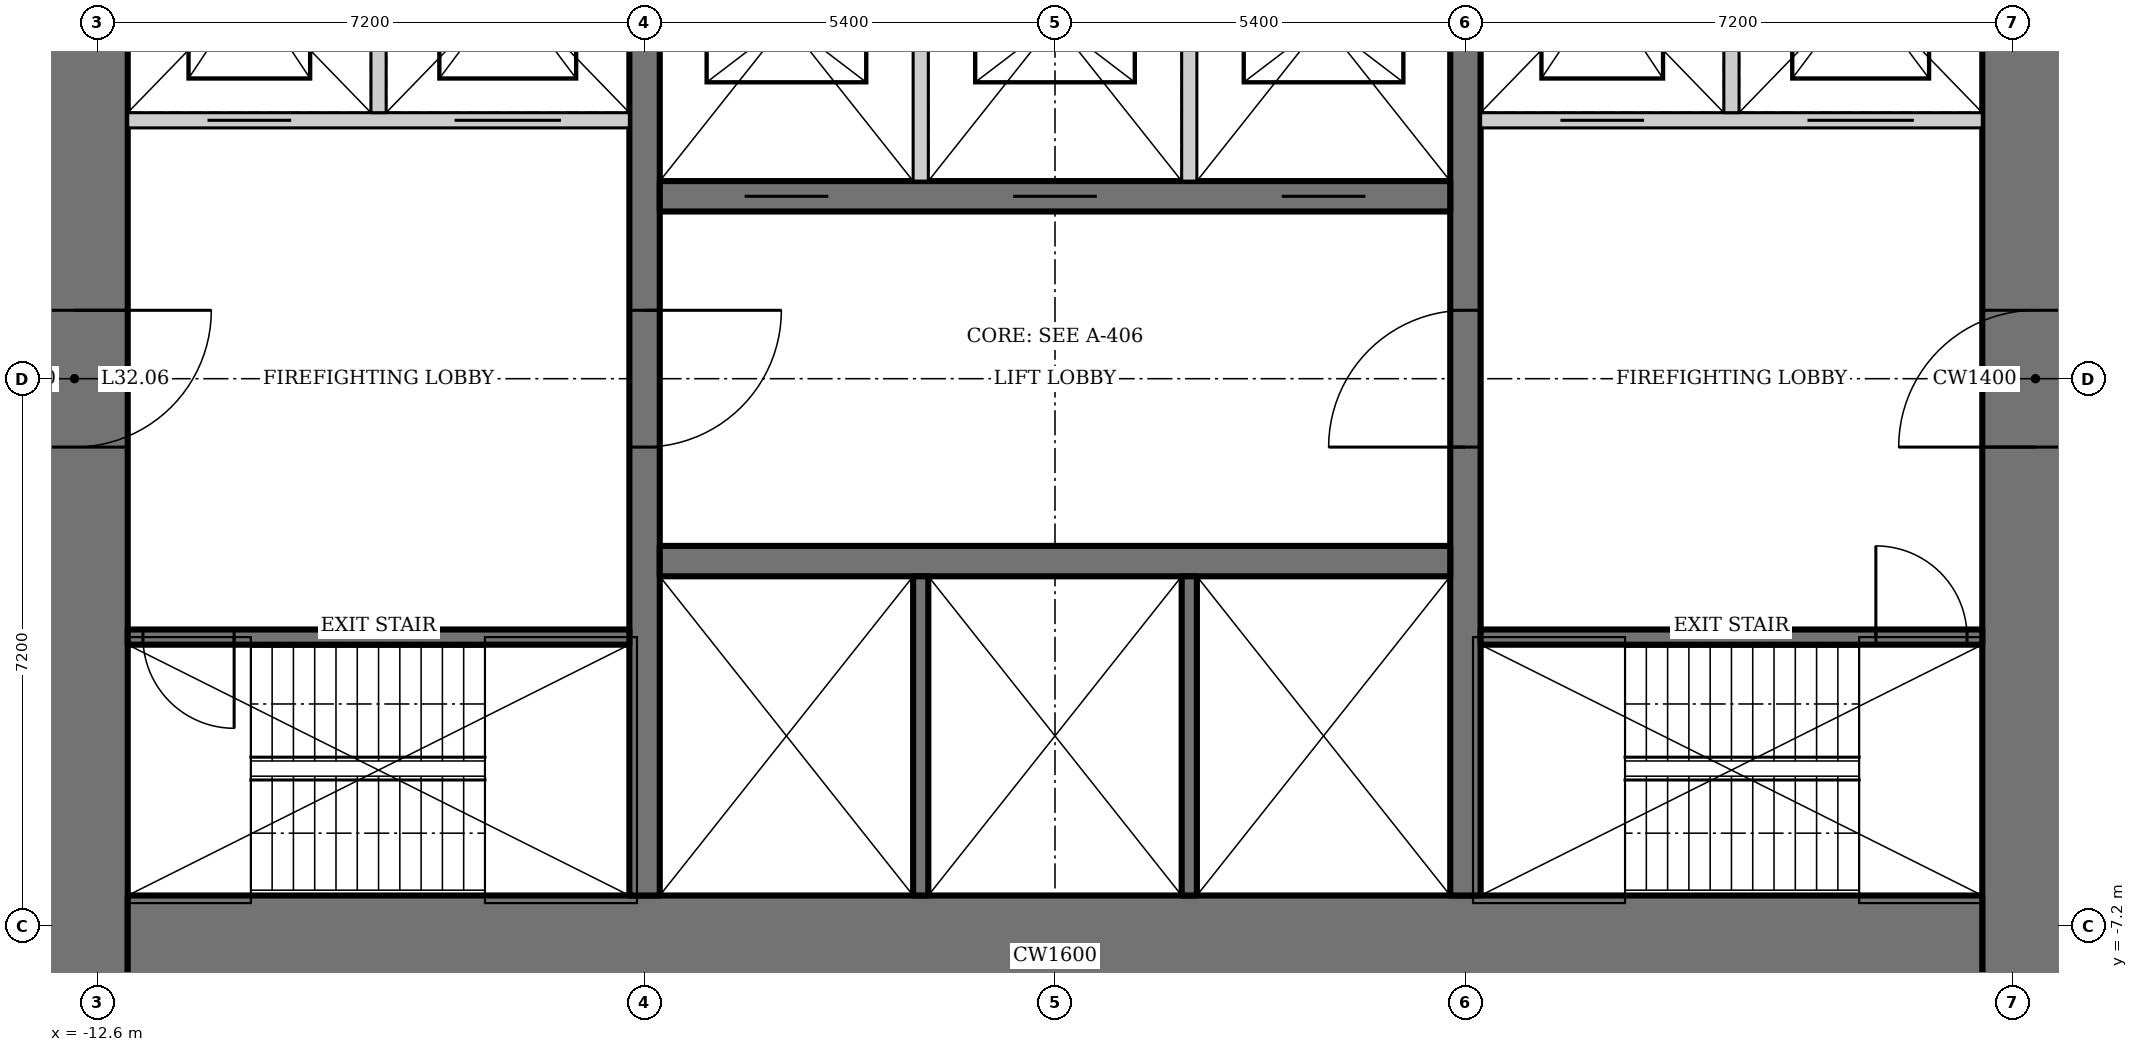
"""IFC4 building model, lengths in metres.
Left out: names, types, materials, properties, quantities, classifications, styles, units other than length and angle.
Written with IfcOpenShell. Run it as: python <this file> out.ifc"""

import sys

from ifc_helpers import new_model, si_unit, direction, frame, frame_2d, origin, place, context, subcontext, project, spatial, rectangle, extrude, element, fill, save


model = new_model("IFC4")
c1 = context("Model", 3, precision=1e-05, world=origin(), true_north=direction((0.0, 1.0)))
c2 = subcontext(c1, "Body", "Model", "MODEL_VIEW")
j1 = project(units=[si_unit("LENGTHUNIT", "METRE"), si_unit("PLANEANGLEUNIT", "RADIAN")], contexts=[c1])
p1 = place(None, origin())
s1 = spatial("IfcSite", under=j1, at=p1, CompositionType="ELEMENT")
p2 = place(p1, origin())
s2 = spatial("IfcBuilding", under=s1, at=p2, CompositionType="ELEMENT")
p3 = place(p2, frame((0.0, 0.0, 138.4)))
s3 = spatial("IfcBuildingStorey", under=s2, at=p3, CompositionType="ELEMENT", Elevation=138.4)
p4 = place(p3, frame((12.9, -13.0, 0.0), z_axis=(0.0, 0.0, 1.0), x_axis=(0.0, 1.0, 0.0)))
e1 = element("IfcWall", 1, at=p4, inside=s3, PredefinedType="SHEAR", context=c2, shape_type="SweptSolid", body=[
    extrude(rectangle(XDim=26.0, YDim=1.4, at=frame_2d((13.0, 0.0))), origin(), (0.0, 0.0, 1.0), 4.2),
])
p5 = place(p4, frame((12.1, 0.0, 0.0)))
e2 = element("IfcOpeningElement", 2, at=p5, cuts=e1, PredefinedType="OPENING", context=c2, shape_type="SweptSolid", body=[
    extrude(rectangle(XDim=1.8, YDim=2.1, at=frame_2d((0.9, 1.05))), frame((0.0, 0.71, 0.0), z_axis=(0.0, -1.0, 0.0), x_axis=(1.0, 0.0, 0.0)), (0.0, 0.0, 1.0), 1.42),
])
p6 = place(p3, frame((-12.9, 13.0, 0.0), z_axis=(0.0, 0.0, 1.0), x_axis=(0.0, -1.0, 0.0)))
e3 = element("IfcWall", 3, at=p6, inside=s3, PredefinedType="SHEAR", context=c2, shape_type="SweptSolid", body=[
    extrude(rectangle(XDim=26.0, YDim=1.4, at=frame_2d((13.0, 0.0))), origin(), (0.0, 0.0, 1.0), 4.2),
])
p7 = place(p6, frame((12.1, 0.0, 0.0)))
e4 = element("IfcOpeningElement", 4, at=p7, cuts=e3, PredefinedType="OPENING", context=c2, shape_type="SweptSolid", body=[
    extrude(rectangle(XDim=1.8, YDim=2.1, at=frame_2d((0.9, 1.05))), frame((0.0, 0.71, 0.0), z_axis=(0.0, -1.0, 0.0), x_axis=(1.0, 0.0, 0.0)), (0.0, 0.0, 1.0), 1.42),
])
p8 = place(p3, frame((-12.2, -7.6, 0.0), z_axis=(0.0, 0.0, 1.0), x_axis=(1.0, 0.0, 0.0)))
e5 = element("IfcWall", 5, at=p8, inside=s3, PredefinedType="SHEAR", context=c2, shape_type="SweptSolid", body=[
    extrude(rectangle(XDim=24.4, YDim=1.6, at=frame_2d((12.2, 0.0))), origin(), (0.0, 0.0, 1.0), 4.2),
])
p9 = place(p3, frame((5.4, -6.8, 0.0), z_axis=(0.0, 0.0, 1.0), x_axis=(0.0, 1.0, 0.0)))
e6 = element("IfcWall", 6, at=p9, inside=s3, PredefinedType="SHEAR", context=c2, shape_type="SweptSolid", body=[
    extrude(rectangle(XDim=13.6, YDim=0.4, at=frame_2d((6.8, 0.0))), origin(), (0.0, 0.0, 1.0), 4.2),
])
p10 = place(p9, frame((5.9, 0.0, 0.0)))
e7 = element("IfcOpeningElement", 7, at=p10, cuts=e6, PredefinedType="OPENING", context=c2, shape_type="SweptSolid", body=[
    extrude(rectangle(XDim=1.8, YDim=2.1, at=frame_2d((0.9, 1.05))), frame((0.0, 0.21, 0.0), z_axis=(0.0, -1.0, 0.0), x_axis=(1.0, 0.0, 0.0)), (0.0, 0.0, 1.0), 0.42),
])
p11 = place(p3, frame((-5.4, 6.8, 0.0), z_axis=(0.0, 0.0, 1.0), x_axis=(0.0, -1.0, 0.0)))
e8 = element("IfcWall", 8, at=p11, inside=s3, PredefinedType="SHEAR", context=c2, shape_type="SweptSolid", body=[
    extrude(rectangle(XDim=13.6, YDim=0.4, at=frame_2d((6.8, 0.0))), origin(), (0.0, 0.0, 1.0), 4.2),
])
p12 = place(p11, frame((5.9, 0.0, 0.0)))
e9 = element("IfcOpeningElement", 9, at=p12, cuts=e8, PredefinedType="OPENING", context=c2, shape_type="SweptSolid", body=[
    extrude(rectangle(XDim=1.8, YDim=2.1, at=frame_2d((0.9, 1.05))), frame((0.0, 0.21, 0.0), z_axis=(0.0, -1.0, 0.0), x_axis=(1.0, 0.0, 0.0)), (0.0, 0.0, 1.0), 0.42),
])
p13 = place(p3, frame((-5.2, -2.4, 0.0), z_axis=(0.0, 0.0, 1.0), x_axis=(1.0, 0.0, 0.0)))
e10 = element("IfcWall", 10, at=p13, inside=s3, PredefinedType="SHEAR", context=c2, shape_type="SweptSolid", body=[
    extrude(rectangle(XDim=10.4, YDim=0.4, at=frame_2d((5.2, 0.0))), origin(), (0.0, 0.0, 1.0), 4.2),
])
for number, where, z_axis, x_axis in (
    (11, (-1.767, -2.6, 0.0), (0.0, 0.0, 1.0), (0.0, -1.0, 0.0)),
    (12, (1.767, -2.6, 0.0), (0.0, 0.0, 1.0), (0.0, -1.0, 0.0)),
):
    element("IfcWall", number, at=place(p3, frame(where, z_axis=z_axis, x_axis=x_axis)), inside=s3, PredefinedType="SOLIDWALL", context=c2, shape_type="SweptSolid", body=[
        extrude(rectangle(XDim=4.2, YDim=0.2, at=frame_2d((2.1, 0.0))), origin(), (0.0, 0.0, 1.0), 4.2),
    ])
p14 = place(p3, frame((5.2, 2.4, 0.0), z_axis=(0.0, 0.0, 1.0), x_axis=(-1.0, 0.0, 0.0)))
e13 = element("IfcWall", 13, at=p14, inside=s3, PredefinedType="SHEAR", context=c2, shape_type="SweptSolid", body=[
    extrude(rectangle(XDim=10.4, YDim=0.4, at=frame_2d((5.2, 0.0))), origin(), (0.0, 0.0, 1.0), 4.2),
])
p15 = place(p14, frame((8.183, 0.0, 0.0)))
e14 = element("IfcOpeningElement", 14, at=p15, cuts=e13, PredefinedType="OPENING", context=c2, shape_type="SweptSolid", body=[
    extrude(rectangle(XDim=1.1, YDim=2.2, at=frame_2d((0.55, 1.1))), frame((0.0, 0.21, 0.0), z_axis=(0.0, -1.0, 0.0), x_axis=(1.0, 0.0, 0.0)), (0.0, 0.0, 1.0), 0.42),
])
p16 = place(p14, frame((4.65, 0.0, 0.0)))
e15 = element("IfcOpeningElement", 15, at=p16, cuts=e13, PredefinedType="OPENING", context=c2, shape_type="SweptSolid", body=[
    extrude(rectangle(XDim=1.1, YDim=2.2, at=frame_2d((0.55, 1.1))), frame((0.0, 0.21, 0.0), z_axis=(0.0, -1.0, 0.0), x_axis=(1.0, 0.0, 0.0)), (0.0, 0.0, 1.0), 0.42),
])
p17 = place(p14, frame((1.117, 0.0, 0.0)))
e16 = element("IfcOpeningElement", 16, at=p17, cuts=e13, PredefinedType="OPENING", context=c2, shape_type="SweptSolid", body=[
    extrude(rectangle(XDim=1.1, YDim=2.2, at=frame_2d((0.55, 1.1))), frame((0.0, 0.21, 0.0), z_axis=(0.0, -1.0, 0.0), x_axis=(1.0, 0.0, 0.0)), (0.0, 0.0, 1.0), 0.42),
])
for number, where, z_axis, x_axis in (
    (17, (-1.767, 2.6, 0.0), (0.0, 0.0, 1.0), (0.0, 1.0, 0.0)),
    (18, (1.767, 2.6, 0.0), (0.0, 0.0, 1.0), (0.0, 1.0, 0.0)),
):
    element("IfcWall", number, at=place(p3, frame(where, z_axis=z_axis, x_axis=x_axis)), inside=s3, PredefinedType="SOLIDWALL", context=c2, shape_type="SweptSolid", body=[
        extrude(rectangle(XDim=4.2, YDim=0.2, at=frame_2d((2.1, 0.0))), origin(), (0.0, 0.0, 1.0), 4.2),
    ])
p18 = place(p3, frame((5.6, -3.4, 0.0), z_axis=(0.0, 0.0, 1.0), x_axis=(1.0, 0.0, 0.0)))
e19 = element("IfcWall", 19, at=p18, inside=s3, PredefinedType="SHEAR", context=c2, shape_type="SweptSolid", body=[
    extrude(rectangle(XDim=6.6, YDim=0.2, at=frame_2d((3.3, 0.0))), origin(), (0.0, 0.0, 1.0), 4.2),
])
p19 = place(p18, frame((5.2, 0.0, 0.0)))
e20 = element("IfcOpeningElement", 20, at=p19, cuts=e19, PredefinedType="OPENING", context=c2, shape_type="SweptSolid", body=[
    extrude(rectangle(XDim=1.2, YDim=2.1, at=frame_2d((0.6, 1.05))), frame((0.0, 0.11, 0.0), z_axis=(0.0, -1.0, 0.0), x_axis=(1.0, 0.0, 0.0)), (0.0, 0.0, 1.0), 0.22),
])
p20 = place(p3, frame((12.2, 3.4, 0.0), z_axis=(0.0, 0.0, 1.0), x_axis=(-1.0, 0.0, 0.0)))
e21 = element("IfcWall", 21, at=p20, inside=s3, PredefinedType="SOLIDWALL", context=c2, shape_type="SweptSolid", body=[
    extrude(rectangle(XDim=6.6, YDim=0.2, at=frame_2d((3.3, 0.0))), origin(), (0.0, 0.0, 1.0), 4.2),
])
p21 = place(p20, frame((4.45, 0.0, 0.0)))
e22 = element("IfcOpeningElement", 22, at=p21, cuts=e21, PredefinedType="OPENING", context=c2, shape_type="SweptSolid", body=[
    extrude(rectangle(XDim=1.1, YDim=2.2, at=frame_2d((0.55, 1.1))), frame((0.0, 0.11, 0.0), z_axis=(0.0, -1.0, 0.0), x_axis=(1.0, 0.0, 0.0)), (0.0, 0.0, 1.0), 0.22),
])
p22 = place(p20, frame((0.9, 0.0, 0.0)))
e23 = element("IfcOpeningElement", 23, at=p22, cuts=e21, PredefinedType="OPENING", context=c2, shape_type="SweptSolid", body=[
    extrude(rectangle(XDim=1.4, YDim=2.2, at=frame_2d((0.7, 1.1))), frame((0.0, 0.11, 0.0), z_axis=(0.0, -1.0, 0.0), x_axis=(1.0, 0.0, 0.0)), (0.0, 0.0, 1.0), 0.22),
])
p23 = place(p3, frame((8.9, 3.5, 0.0), z_axis=(0.0, 0.0, 1.0), x_axis=(0.0, 1.0, 0.0)))
e24 = element("IfcWall", 24, at=p23, inside=s3, PredefinedType="SOLIDWALL", context=c2, shape_type="SweptSolid", body=[
    extrude(rectangle(XDim=3.3, YDim=0.2, at=frame_2d((1.65, 0.0))), origin(), (0.0, 0.0, 1.0), 4.2),
])
p24 = place(p3, frame((-5.6, -3.4, 0.0), z_axis=(0.0, 0.0, 1.0), x_axis=(-1.0, 0.0, 0.0)))
e25 = element("IfcWall", 25, at=p24, inside=s3, PredefinedType="SHEAR", context=c2, shape_type="SweptSolid", body=[
    extrude(rectangle(XDim=6.6, YDim=0.2, at=frame_2d((3.3, 0.0))), origin(), (0.0, 0.0, 1.0), 4.2),
])
p25 = place(p24, frame((5.2, 0.0, 0.0)))
e26 = element("IfcOpeningElement", 26, at=p25, cuts=e25, PredefinedType="OPENING", context=c2, shape_type="SweptSolid", body=[
    extrude(rectangle(XDim=1.2, YDim=2.1, at=frame_2d((0.6, 1.05))), frame((0.0, 0.11, 0.0), z_axis=(0.0, -1.0, 0.0), x_axis=(1.0, 0.0, 0.0)), (0.0, 0.0, 1.0), 0.22),
])
p26 = place(p3, frame((-12.2, 3.4, 0.0), z_axis=(0.0, 0.0, 1.0), x_axis=(1.0, 0.0, 0.0)))
e27 = element("IfcWall", 27, at=p26, inside=s3, PredefinedType="SOLIDWALL", context=c2, shape_type="SweptSolid", body=[
    extrude(rectangle(XDim=6.6, YDim=0.2, at=frame_2d((3.3, 0.0))), origin(), (0.0, 0.0, 1.0), 4.2),
])
p27 = place(p26, frame((1.05, 0.0, 0.0)))
e28 = element("IfcOpeningElement", 28, at=p27, cuts=e27, PredefinedType="OPENING", context=c2, shape_type="SweptSolid", body=[
    extrude(rectangle(XDim=1.1, YDim=2.2, at=frame_2d((0.55, 1.1))), frame((0.0, 0.11, 0.0), z_axis=(0.0, -1.0, 0.0), x_axis=(1.0, 0.0, 0.0)), (0.0, 0.0, 1.0), 0.22),
])
p28 = place(p26, frame((4.3, 0.0, 0.0)))
e29 = element("IfcOpeningElement", 29, at=p28, cuts=e27, PredefinedType="OPENING", context=c2, shape_type="SweptSolid", body=[
    extrude(rectangle(XDim=1.4, YDim=2.2, at=frame_2d((0.7, 1.1))), frame((0.0, 0.11, 0.0), z_axis=(0.0, -1.0, 0.0), x_axis=(1.0, 0.0, 0.0)), (0.0, 0.0, 1.0), 0.22),
])
p29 = place(p3, frame((-8.9, 3.5, 0.0), z_axis=(0.0, 0.0, 1.0), x_axis=(0.0, 1.0, 0.0)))
e30 = element("IfcWall", 30, at=p29, inside=s3, PredefinedType="SOLIDWALL", context=c2, shape_type="SweptSolid", body=[
    extrude(rectangle(XDim=3.3, YDim=0.2, at=frame_2d((1.65, 0.0))), origin(), (0.0, 0.0, 1.0), 4.2),
])
p30 = place(p10, origin())
e31 = element("IfcDoor", 31, at=p30, inside=s3, OperationType="DOUBLE_DOOR_DOUBLE_SWING", PredefinedType="DOOR", context=c2, shape_type="SweptSolid", body=[
    extrude(rectangle(XDim=1.8, YDim=2.1, at=frame_2d((0.9, 1.05))), frame((0.0, 0.025, 0.0), z_axis=(0.0, -1.0, 0.0), x_axis=(1.0, 0.0, 0.0)), (0.0, 0.0, 1.0), 0.05),
])
fill(e7, e31)
p31 = place(p12, origin())
e32 = element("IfcDoor", 32, at=p31, inside=s3, OperationType="DOUBLE_DOOR_DOUBLE_SWING", PredefinedType="DOOR", context=c2, shape_type="SweptSolid", body=[
    extrude(rectangle(XDim=1.8, YDim=2.1, at=frame_2d((0.9, 1.05))), frame((0.0, 0.025, 0.0), z_axis=(0.0, -1.0, 0.0), x_axis=(1.0, 0.0, 0.0)), (0.0, 0.0, 1.0), 0.05),
])
fill(e9, e32)
p32 = place(p19, origin())
e33 = element("IfcDoor", 33, at=p32, inside=s3, OperationType="SINGLE_SWING_RIGHT", PredefinedType="DOOR", context=c2, shape_type="SweptSolid", body=[
    extrude(rectangle(XDim=1.2, YDim=2.1, at=frame_2d((0.6, 1.05))), frame((0.0, 0.025, 0.0), z_axis=(0.0, -1.0, 0.0), x_axis=(1.0, 0.0, 0.0)), (0.0, 0.0, 1.0), 0.05),
])
fill(e20, e33)
p33 = place(p25, origin())
e34 = element("IfcDoor", 34, at=p33, inside=s3, OperationType="SINGLE_SWING_RIGHT", PredefinedType="DOOR", context=c2, shape_type="SweptSolid", body=[
    extrude(rectangle(XDim=1.2, YDim=2.1, at=frame_2d((0.6, 1.05))), frame((0.0, 0.025, 0.0), z_axis=(0.0, -1.0, 0.0), x_axis=(1.0, 0.0, 0.0)), (0.0, 0.0, 1.0), 0.05),
])
fill(e26, e34)
p34 = place(p5, origin())
e35 = element("IfcDoor", 35, at=p34, inside=s3, OperationType="DOUBLE_DOOR_DOUBLE_SWING", PredefinedType="DOOR", context=c2, shape_type="SweptSolid", body=[
    extrude(rectangle(XDim=1.8, YDim=2.1, at=frame_2d((0.9, 1.05))), frame((0.0, 0.025, 0.0), z_axis=(0.0, -1.0, 0.0), x_axis=(1.0, 0.0, 0.0)), (0.0, 0.0, 1.0), 0.05),
])
fill(e2, e35)
p35 = place(p7, origin())
e36 = element("IfcDoor", 36, at=p35, inside=s3, OperationType="DOUBLE_DOOR_DOUBLE_SWING", PredefinedType="DOOR", context=c2, shape_type="SweptSolid", body=[
    extrude(rectangle(XDim=1.8, YDim=2.1, at=frame_2d((0.9, 1.05))), frame((0.0, 0.025, 0.0), z_axis=(0.0, -1.0, 0.0), x_axis=(1.0, 0.0, 0.0)), (0.0, 0.0, 1.0), 0.05),
])
fill(e4, e36)
p36 = place(p15, origin())
e37 = element("IfcDoor", 37, at=p36, inside=s3, OperationType="DOUBLE_DOOR_SLIDING", PredefinedType="DOOR", context=c2, shape_type="SweptSolid", body=[
    extrude(rectangle(XDim=1.1, YDim=2.2, at=frame_2d((0.55, 1.1))), frame((0.0, 0.025, 0.0), z_axis=(0.0, -1.0, 0.0), x_axis=(1.0, 0.0, 0.0)), (0.0, 0.0, 1.0), 0.05),
])
fill(e14, e37)
p37 = place(p16, origin())
e38 = element("IfcDoor", 38, at=p37, inside=s3, OperationType="DOUBLE_DOOR_SLIDING", PredefinedType="DOOR", context=c2, shape_type="SweptSolid", body=[
    extrude(rectangle(XDim=1.1, YDim=2.2, at=frame_2d((0.55, 1.1))), frame((0.0, 0.025, 0.0), z_axis=(0.0, -1.0, 0.0), x_axis=(1.0, 0.0, 0.0)), (0.0, 0.0, 1.0), 0.05),
])
fill(e15, e38)
p38 = place(p17, origin())
e39 = element("IfcDoor", 39, at=p38, inside=s3, OperationType="DOUBLE_DOOR_SLIDING", PredefinedType="DOOR", context=c2, shape_type="SweptSolid", body=[
    extrude(rectangle(XDim=1.1, YDim=2.2, at=frame_2d((0.55, 1.1))), frame((0.0, 0.025, 0.0), z_axis=(0.0, -1.0, 0.0), x_axis=(1.0, 0.0, 0.0)), (0.0, 0.0, 1.0), 0.05),
])
fill(e16, e39)
p39 = place(p27, origin())
e40 = element("IfcDoor", 40, at=p39, inside=s3, OperationType="DOUBLE_DOOR_SLIDING", PredefinedType="DOOR", context=c2, shape_type="SweptSolid", body=[
    extrude(rectangle(XDim=1.1, YDim=2.2, at=frame_2d((0.55, 1.1))), frame((0.0, 0.025, 0.0), z_axis=(0.0, -1.0, 0.0), x_axis=(1.0, 0.0, 0.0)), (0.0, 0.0, 1.0), 0.05),
])
fill(e28, e40)
p40 = place(p28, origin())
e41 = element("IfcDoor", 41, at=p40, inside=s3, OperationType="DOUBLE_DOOR_SLIDING", PredefinedType="DOOR", context=c2, shape_type="SweptSolid", body=[
    extrude(rectangle(XDim=1.4, YDim=2.2, at=frame_2d((0.7, 1.1))), frame((0.0, 0.025, 0.0), z_axis=(0.0, -1.0, 0.0), x_axis=(1.0, 0.0, 0.0)), (0.0, 0.0, 1.0), 0.05),
])
fill(e29, e41)
p41 = place(p21, origin())
e42 = element("IfcDoor", 42, at=p41, inside=s3, OperationType="DOUBLE_DOOR_SLIDING", PredefinedType="DOOR", context=c2, shape_type="SweptSolid", body=[
    extrude(rectangle(XDim=1.1, YDim=2.2, at=frame_2d((0.55, 1.1))), frame((0.0, 0.025, 0.0), z_axis=(0.0, -1.0, 0.0), x_axis=(1.0, 0.0, 0.0)), (0.0, 0.0, 1.0), 0.05),
])
fill(e22, e42)
p42 = place(p22, origin())
e43 = element("IfcDoor", 43, at=p42, inside=s3, OperationType="DOUBLE_DOOR_SLIDING", PredefinedType="DOOR", context=c2, shape_type="SweptSolid", body=[
    extrude(rectangle(XDim=1.4, YDim=2.2, at=frame_2d((0.7, 1.1))), frame((0.0, 0.025, 0.0), z_axis=(0.0, -1.0, 0.0), x_axis=(1.0, 0.0, 0.0)), (0.0, 0.0, 1.0), 0.05),
])
fill(e23, e43)
save(model, sys.argv[1])
